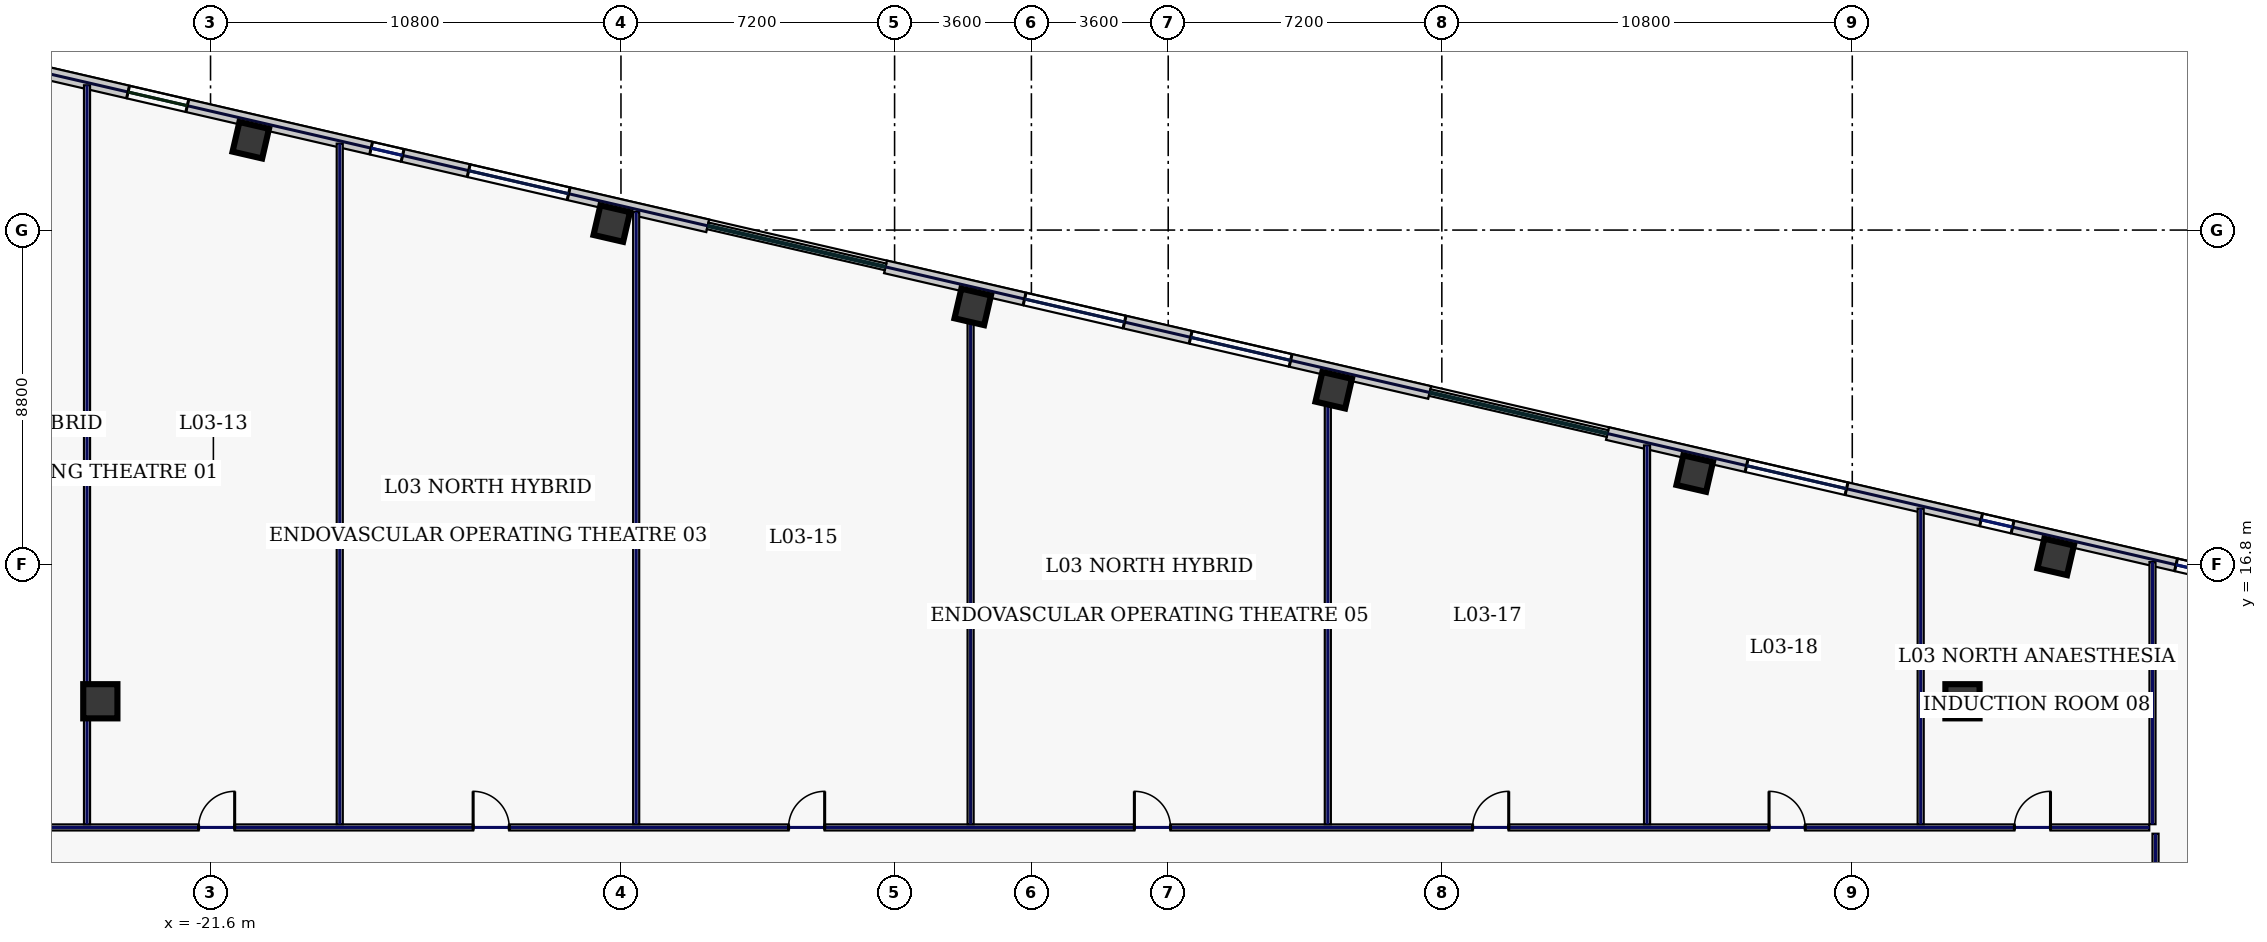
"""IFC4 building model, lengths in metres.
Left out: names, types, materials, properties, quantities, classifications, styles, units other than length and angle.
Written with IfcOpenShell. Run it as: python <this file> out.ifc"""

import sys

from ifc_helpers import new_model, si_unit, direction, frame, frame_2d, origin, origin_2d, place, context, subcontext, project, spatial, rectangle, hollow_rectangle, extrude, element, fill, save


model = new_model("IFC4")
c1 = context("Model", 3, precision=1e-05, world=origin(), true_north=direction((0.0, 1.0)))
c2 = subcontext(c1, "Body", "Model", "MODEL_VIEW")
j1 = project(units=[si_unit("LENGTHUNIT", "METRE"), si_unit("PLANEANGLEUNIT", "RADIAN")], contexts=[c1])
p1 = place(None, origin())
s1 = spatial("IfcSite", under=j1, at=p1, CompositionType="ELEMENT")
p2 = place(p1, origin())
s2 = spatial("IfcBuilding", under=s1, at=p2, CompositionType="ELEMENT")
p3 = place(p2, frame((0.0, 0.0, 18.4)))
s3 = spatial("IfcBuildingStorey", under=s2, at=p3, CompositionType="ELEMENT", Elevation=18.4)
for number, where, z_axis, x_axis in (
    (1, (-24.5, 13.2, 0.0), (0.0, 0.0, 1.0), (1.0, 0.0, 0.0)),
    (2, (24.5, 13.2, 0.0), (0.0, 0.0, 1.0), (1.0, 0.0, 0.0)),
):
    element("IfcColumn", number, at=place(p3, frame(where, z_axis=z_axis, x_axis=x_axis)), inside=s3, PredefinedType="COLUMN", context=c2, shape_type="SweptSolid", body=[
        extrude(hollow_rectangle(XDim=0.9, YDim=0.9, WallThickness=0.04, at=origin_2d()), origin(), (0.0, 0.0, 1.0), 4.7),
    ])
for number, where, z_axis, x_axis in (
    (3, (26.952, 16.999, 0.0), (0.0, 0.0, 1.0), (0.974, -0.225, 0.0)),
    (4, (17.454, 19.192, 0.0), (0.0, 0.0, 1.0), (0.974, -0.225, 0.0)),
    (5, (7.955, 21.385, 0.0), (0.0, 0.0, 1.0), (0.974, -0.225, 0.0)),
    (6, (-1.544, 23.578, 0.0), (0.0, 0.0, 1.0), (0.974, -0.225, 0.0)),
    (7, (-11.042, 25.771, 0.0), (0.0, 0.0, 1.0), (0.974, -0.225, 0.0)),
    (8, (-20.541, 27.964, 0.0), (0.0, 0.0, 1.0), (0.974, -0.225, 0.0)),
):
    element("IfcColumn", number, at=place(p3, frame(where, z_axis=z_axis, x_axis=x_axis)), inside=s3, PredefinedType="COLUMN", context=c2, shape_type="SweptSolid", body=[
        extrude(hollow_rectangle(XDim=0.8, YDim=0.8, WallThickness=0.036, at=origin_2d()), origin(), (0.0, 0.0, 1.0), 4.7),
    ])
p4 = place(p3, frame((37.229, 15.15, 0.0), z_axis=(0.0, 0.0, 1.0), x_axis=(-0.97436993772, 0.224951604723, 0.0)))
e9 = element("IfcWall", 9, at=p4, inside=s3, PredefinedType="STANDARD", context=c2, shape_type="SweptSolid", body=[
    extrude(rectangle(XDim=22.651, YDim=0.34, at=frame_2d((11.326, 0.0))), origin(), (0.0, 0.0, 1.0), 4.7),
])
p5 = place(p4, frame((16.195, 0.0, 0.9)))
e10 = element("IfcOpeningElement", 10, at=p5, cuts=e9, PredefinedType="OPENING", context=c2, shape_type="SweptSolid", body=[
    extrude(rectangle(XDim=2.7, YDim=2.2, at=frame_2d((1.35, 1.1))), frame((0.0, 0.18, 0.0), z_axis=(0.0, -1.0, 0.0), x_axis=(1.0, 0.0, 0.0)), (0.0, 0.0, 1.0), 0.36),
])
p6 = place(p4, frame((11.711, 0.0, 0.9)))
e11 = element("IfcOpeningElement", 11, at=p6, cuts=e9, PredefinedType="OPENING", context=c2, shape_type="SweptSolid", body=[
    extrude(rectangle(XDim=0.85, YDim=1.85, at=frame_2d((0.425, 0.925))), frame((0.0, 0.18, 0.0), z_axis=(0.0, -1.0, 0.0), x_axis=(1.0, 0.0, 0.0)), (0.0, 0.0, 1.0), 0.36),
])
p7 = place(p4, frame((6.447, 0.0, 0.9)))
e12 = element("IfcOpeningElement", 12, at=p7, cuts=e9, PredefinedType="OPENING", context=c2, shape_type="SweptSolid", body=[
    extrude(rectangle(XDim=0.85, YDim=1.85, at=frame_2d((0.425, 0.925))), frame((0.0, 0.18, 0.0), z_axis=(0.0, -1.0, 0.0), x_axis=(1.0, 0.0, 0.0)), (0.0, 0.0, 1.0), 0.36),
])
p8 = place(p4, frame((1.962, 0.0, 0.9)))
e13 = element("IfcOpeningElement", 13, at=p8, cuts=e9, PredefinedType="OPENING", context=c2, shape_type="SweptSolid", body=[
    extrude(rectangle(XDim=2.7, YDim=2.2, at=frame_2d((1.35, 1.1))), frame((0.0, 0.18, 0.0), z_axis=(0.0, -1.0, 0.0), x_axis=(1.0, 0.0, 0.0)), (0.0, 0.0, 1.0), 0.36),
])
p9 = place(p3, frame((10.481, 21.325, 0.0), z_axis=(0.0, 0.0, 1.0), x_axis=(-0.974369353393, 0.2249541357, 0.0)))
e14 = element("IfcWall", 14, at=p9, inside=s3, PredefinedType="STANDARD", context=c2, shape_type="SweptSolid", body=[
    extrude(rectangle(XDim=14.697, YDim=0.34, at=frame_2d((7.349, 0.0))), origin(), (0.0, 0.0, 1.0), 4.7),
])
p10 = place(p9, frame((8.241, 0.0, 0.9)))
e15 = element("IfcOpeningElement", 15, at=p10, cuts=e14, PredefinedType="OPENING", context=c2, shape_type="SweptSolid", body=[
    extrude(rectangle(XDim=2.7, YDim=2.2, at=frame_2d((1.35, 1.1))), frame((0.0, 0.18, 0.0), z_axis=(0.0, -1.0, 0.0), x_axis=(1.0, 0.0, 0.0)), (0.0, 0.0, 1.0), 0.36),
])
p11 = place(p9, frame((3.756, 0.0, 0.9)))
e16 = element("IfcOpeningElement", 16, at=p11, cuts=e14, PredefinedType="OPENING", context=c2, shape_type="SweptSolid", body=[
    extrude(rectangle(XDim=2.7, YDim=2.2, at=frame_2d((1.35, 1.1))), frame((0.0, 0.18, 0.0), z_axis=(0.0, -1.0, 0.0), x_axis=(1.0, 0.0, 0.0)), (0.0, 0.0, 1.0), 0.36),
])
p12 = place(p3, frame((-8.517, 25.711, 0.0), z_axis=(0.0, 0.0, 1.0), x_axis=(-0.974372845456, 0.224939009598, 0.0)))
e17 = element("IfcWall", 17, at=p12, inside=s3, PredefinedType="STANDARD", context=c2, shape_type="SweptSolid", body=[
    extrude(rectangle(XDim=22.652, YDim=0.34, at=frame_2d((11.326, 0.0))), origin(), (0.0, 0.0, 1.0), 4.7),
])
p13 = place(p12, frame((17.989, 0.0, 0.9)))
e18 = element("IfcOpeningElement", 18, at=p13, cuts=e17, PredefinedType="OPENING", context=c2, shape_type="SweptSolid", body=[
    extrude(rectangle(XDim=2.7, YDim=2.2, at=frame_2d((1.35, 1.1))), frame((0.0, 0.18, 0.0), z_axis=(0.0, -1.0, 0.0), x_axis=(1.0, 0.0, 0.0)), (0.0, 0.0, 1.0), 0.36),
])
p14 = place(p12, frame((14.055, 0.0, 0.22)))
e19 = element("IfcOpeningElement", 19, at=p14, cuts=e17, PredefinedType="OPENING", context=c2, shape_type="SweptSolid", body=[
    extrude(rectangle(XDim=1.6, YDim=1.2, at=frame_2d((0.8, 0.6))), frame((0.0, 0.18, 0.0), z_axis=(0.0, -1.0, 0.0), x_axis=(1.0, 0.0, 0.0)), (0.0, 0.0, 1.0), 0.36),
])
p15 = place(p12, frame((8.241, 0.0, 0.9)))
e20 = element("IfcOpeningElement", 20, at=p15, cuts=e17, PredefinedType="OPENING", context=c2, shape_type="SweptSolid", body=[
    extrude(rectangle(XDim=0.85, YDim=1.85, at=frame_2d((0.425, 0.925))), frame((0.0, 0.18, 0.0), z_axis=(0.0, -1.0, 0.0), x_axis=(1.0, 0.0, 0.0)), (0.0, 0.0, 1.0), 0.36),
])
p16 = place(p12, frame((3.756, 0.0, 0.9)))
e21 = element("IfcOpeningElement", 21, at=p16, cuts=e17, PredefinedType="OPENING", context=c2, shape_type="SweptSolid", body=[
    extrude(rectangle(XDim=2.7, YDim=2.2, at=frame_2d((1.35, 1.1))), frame((0.0, 0.18, 0.0), z_axis=(0.0, -1.0, 0.0), x_axis=(1.0, 0.0, 0.0)), (0.0, 0.0, 1.0), 0.36),
])
p17 = place(p3, frame((-29.415, 9.88, 0.0), z_axis=(0.0, 0.0, 1.0), x_axis=(1.0, 0.0, 0.0)))
e22 = element("IfcWall", 22, at=p17, inside=s3, PredefinedType="PARTITIONING", context=c2, shape_type="SweptSolid", body=[
    extrude(rectangle(XDim=58.83, YDim=0.16, at=frame_2d((29.415, 0.0))), origin(), (0.0, 0.0, 1.0), 4.7),
])
p18 = place(p17, frame((2.044, 0.0, 0.0)))
e23 = element("IfcOpeningElement", 23, at=p18, cuts=e22, PredefinedType="OPENING", context=c2, shape_type="SweptSolid", body=[
    extrude(rectangle(XDim=0.95, YDim=2.2, at=frame_2d((0.475, 1.1))), frame((0.0, 0.09, 0.0), z_axis=(0.0, -1.0, 0.0), x_axis=(1.0, 0.0, 0.0)), (0.0, 0.0, 1.0), 0.18),
])
p19 = place(p17, frame((7.5, 0.0, 0.0)))
e24 = element("IfcOpeningElement", 24, at=p19, cuts=e22, PredefinedType="OPENING", context=c2, shape_type="SweptSolid", body=[
    extrude(rectangle(XDim=0.95, YDim=2.2, at=frame_2d((0.475, 1.1))), frame((0.0, 0.09, 0.0), z_axis=(0.0, -1.0, 0.0), x_axis=(1.0, 0.0, 0.0)), (0.0, 0.0, 1.0), 0.18),
])
p20 = place(p17, frame((14.725, 0.0, 0.0)))
e25 = element("IfcOpeningElement", 25, at=p20, cuts=e22, PredefinedType="OPENING", context=c2, shape_type="SweptSolid", body=[
    extrude(rectangle(XDim=0.95, YDim=2.2, at=frame_2d((0.475, 1.1))), frame((0.0, 0.09, 0.0), z_axis=(0.0, -1.0, 0.0), x_axis=(1.0, 0.0, 0.0)), (0.0, 0.0, 1.0), 0.18),
])
p21 = place(p17, frame((23.025, 0.0, 0.0)))
e26 = element("IfcOpeningElement", 26, at=p21, cuts=e22, PredefinedType="OPENING", context=c2, shape_type="SweptSolid", body=[
    extrude(rectangle(XDim=0.95, YDim=2.2, at=frame_2d((0.475, 1.1))), frame((0.0, 0.09, 0.0), z_axis=(0.0, -1.0, 0.0), x_axis=(1.0, 0.0, 0.0)), (0.0, 0.0, 1.0), 0.18),
])
p22 = place(p17, frame((32.125, 0.0, 0.0)))
e27 = element("IfcOpeningElement", 27, at=p22, cuts=e22, PredefinedType="OPENING", context=c2, shape_type="SweptSolid", body=[
    extrude(rectangle(XDim=0.95, YDim=2.2, at=frame_2d((0.475, 1.1))), frame((0.0, 0.09, 0.0), z_axis=(0.0, -1.0, 0.0), x_axis=(1.0, 0.0, 0.0)), (0.0, 0.0, 1.0), 0.18),
])
p23 = place(p17, frame((41.025, 0.0, 0.0)))
e28 = element("IfcOpeningElement", 28, at=p23, cuts=e22, PredefinedType="OPENING", context=c2, shape_type="SweptSolid", body=[
    extrude(rectangle(XDim=0.95, YDim=2.2, at=frame_2d((0.475, 1.1))), frame((0.0, 0.09, 0.0), z_axis=(0.0, -1.0, 0.0), x_axis=(1.0, 0.0, 0.0)), (0.0, 0.0, 1.0), 0.18),
])
p24 = place(p17, frame((48.825, 0.0, 0.0)))
e29 = element("IfcOpeningElement", 29, at=p24, cuts=e22, PredefinedType="OPENING", context=c2, shape_type="SweptSolid", body=[
    extrude(rectangle(XDim=0.95, YDim=2.2, at=frame_2d((0.475, 1.1))), frame((0.0, 0.09, 0.0), z_axis=(0.0, -1.0, 0.0), x_axis=(1.0, 0.0, 0.0)), (0.0, 0.0, 1.0), 0.18),
])
p25 = place(p17, frame((55.281, 0.0, 0.0)))
e30 = element("IfcOpeningElement", 30, at=p25, cuts=e22, PredefinedType="OPENING", context=c2, shape_type="SweptSolid", body=[
    extrude(rectangle(XDim=0.95, YDim=2.2, at=frame_2d((0.475, 1.1))), frame((0.0, 0.09, 0.0), z_axis=(0.0, -1.0, 0.0), x_axis=(1.0, 0.0, 0.0)), (0.0, 0.0, 1.0), 0.18),
])
p26 = place(p3, frame((29.58, 9.715, 0.0), z_axis=(0.0, 0.0, 1.0), x_axis=(0.0, -1.0, 0.0)))
e31 = element("IfcWall", 31, at=p26, inside=s3, PredefinedType="PARTITIONING", context=c2, shape_type="SweptSolid", body=[
    extrude(rectangle(XDim=19.43, YDim=0.16, at=frame_2d((9.715, 0.0))), origin(), (0.0, 0.0, 1.0), 4.7),
])
p27 = place(p26, frame((16.631, 0.0, 0.0)))
e32 = element("IfcOpeningElement", 32, at=p27, cuts=e31, PredefinedType="OPENING", context=c2, shape_type="SweptSolid", body=[
    extrude(rectangle(XDim=0.95, YDim=2.2, at=frame_2d((0.475, 1.1))), frame((0.0, 0.09, 0.0), z_axis=(0.0, -1.0, 0.0), x_axis=(1.0, 0.0, 0.0)), (0.0, 0.0, 1.0), 0.18),
])
p28 = place(p26, frame((11.925, 0.0, 0.0)))
e33 = element("IfcOpeningElement", 33, at=p28, cuts=e31, PredefinedType="OPENING", context=c2, shape_type="SweptSolid", body=[
    extrude(rectangle(XDim=0.95, YDim=2.2, at=frame_2d((0.475, 1.1))), frame((0.0, 0.09, 0.0), z_axis=(0.0, -1.0, 0.0), x_axis=(1.0, 0.0, 0.0)), (0.0, 0.0, 1.0), 0.18),
])
p29 = place(p26, frame((6.725, 0.0, 0.0)))
e34 = element("IfcOpeningElement", 34, at=p29, cuts=e31, PredefinedType="OPENING", context=c2, shape_type="SweptSolid", body=[
    extrude(rectangle(XDim=0.95, YDim=2.2, at=frame_2d((0.475, 1.1))), frame((0.0, 0.09, 0.0), z_axis=(0.0, -1.0, 0.0), x_axis=(1.0, 0.0, 0.0)), (0.0, 0.0, 1.0), 0.18),
])
p30 = place(p26, frame((2.019, 0.0, 0.0)))
e35 = element("IfcOpeningElement", 35, at=p30, cuts=e31, PredefinedType="OPENING", context=c2, shape_type="SweptSolid", body=[
    extrude(rectangle(XDim=0.95, YDim=2.2, at=frame_2d((0.475, 1.1))), frame((0.0, 0.09, 0.0), z_axis=(0.0, -1.0, 0.0), x_axis=(1.0, 0.0, 0.0)), (0.0, 0.0, 1.0), 0.18),
])
p31 = place(p3, frame((29.5, 9.965, 0.0), z_axis=(0.0, 0.0, 1.0), x_axis=(0.0, 1.0, 0.0)))
e36 = element("IfcWall", 36, at=p31, inside=s3, PredefinedType="PARTITIONING", context=c2, shape_type="SweptSolid", body=[
    extrude(rectangle(XDim=6.897, YDim=0.16, at=frame_2d((3.449, 0.0))), origin(), (0.0, 0.0, 1.0), 4.7),
])
p32 = place(p3, frame((-24.85, 9.965, 0.0), z_axis=(0.0, 0.0, 1.0), x_axis=(0.0, 1.0, 0.0)))
e37 = element("IfcWall", 37, at=p32, inside=s3, PredefinedType="PARTITIONING", context=c2, shape_type="SweptSolid", body=[
    extrude(rectangle(XDim=19.445, YDim=0.16, at=frame_2d((9.723, 0.0))), origin(), (0.0, 0.0, 1.0), 4.7),
])
p33 = place(p3, frame((-18.2, 9.965, 0.0), z_axis=(0.0, 0.0, 1.0), x_axis=(0.0, 1.0, 0.0)))
e38 = element("IfcWall", 38, at=p33, inside=s3, PredefinedType="PARTITIONING", context=c2, shape_type="SweptSolid", body=[
    extrude(rectangle(XDim=17.91, YDim=0.16, at=frame_2d((8.955, 0.0))), origin(), (0.0, 0.0, 1.0), 4.7),
])
p34 = place(p3, frame((-10.4, 9.965, 0.0), z_axis=(0.0, 0.0, 1.0), x_axis=(0.0, 1.0, 0.0)))
e39 = element("IfcWall", 39, at=p34, inside=s3, PredefinedType="PARTITIONING", context=c2, shape_type="SweptSolid", body=[
    extrude(rectangle(XDim=16.109, YDim=0.16, at=frame_2d((8.054, 0.0))), origin(), (0.0, 0.0, 1.0), 4.7),
])
p35 = place(p3, frame((-1.6, 9.965, 0.0), z_axis=(0.0, 0.0, 1.0), x_axis=(0.0, 1.0, 0.0)))
e40 = element("IfcWall", 40, at=p35, inside=s3, PredefinedType="PARTITIONING", context=c2, shape_type="SweptSolid", body=[
    extrude(rectangle(XDim=14.077, YDim=0.16, at=frame_2d((7.039, 0.0))), origin(), (0.0, 0.0, 1.0), 4.195),
])
p36 = place(p3, frame((7.8, 9.965, 0.0), z_axis=(0.0, 0.0, 1.0), x_axis=(0.0, 1.0, 0.0)))
e41 = element("IfcWall", 41, at=p36, inside=s3, PredefinedType="PARTITIONING", context=c2, shape_type="SweptSolid", body=[
    extrude(rectangle(XDim=11.907, YDim=0.16, at=frame_2d((5.954, 0.0))), origin(), (0.0, 0.0, 1.0), 4.7),
])
p37 = place(p3, frame((16.2, 9.965, 0.0), z_axis=(0.0, 0.0, 1.0), x_axis=(0.0, 1.0, 0.0)))
e42 = element("IfcWall", 42, at=p37, inside=s3, PredefinedType="PARTITIONING", context=c2, shape_type="SweptSolid", body=[
    extrude(rectangle(XDim=9.968, YDim=0.16, at=frame_2d((4.984, 0.0))), origin(), (0.0, 0.0, 1.0), 4.7),
])
p38 = place(p3, frame((23.4, 9.965, 0.0), z_axis=(0.0, 0.0, 1.0), x_axis=(0.0, 1.0, 0.0)))
e43 = element("IfcWall", 43, at=p38, inside=s3, PredefinedType="PARTITIONING", context=c2, shape_type="SweptSolid", body=[
    extrude(rectangle(XDim=8.306, YDim=0.16, at=frame_2d((4.153, 0.0))), origin(), (0.0, 0.0, 1.0), 4.7),
])
p39 = place(p5, origin())
e44 = element("IfcWindow", 44, at=p39, inside=s3, PartitioningType="SINGLE_PANEL", PredefinedType="WINDOW", context=c2, shape_type="SweptSolid", body=[
    extrude(rectangle(XDim=2.7, YDim=2.2, at=frame_2d((1.35, 1.1))), frame((0.0, 0.03, 0.0), z_axis=(0.0, -1.0, 0.0), x_axis=(1.0, 0.0, 0.0)), (0.0, 0.0, 1.0), 0.06),
])
fill(e10, e44)
p40 = place(p6, origin())
e45 = element("IfcWindow", 45, at=p40, inside=s3, PartitioningType="SINGLE_PANEL", PredefinedType="WINDOW", context=c2, shape_type="SweptSolid", body=[
    extrude(rectangle(XDim=0.85, YDim=1.85, at=frame_2d((0.425, 0.925))), frame((0.0, 0.03, 0.0), z_axis=(0.0, -1.0, 0.0), x_axis=(1.0, 0.0, 0.0)), (0.0, 0.0, 1.0), 0.06),
])
fill(e11, e45)
p41 = place(p7, origin())
e46 = element("IfcWindow", 46, at=p41, inside=s3, PartitioningType="SINGLE_PANEL", PredefinedType="WINDOW", context=c2, shape_type="SweptSolid", body=[
    extrude(rectangle(XDim=0.85, YDim=1.85, at=frame_2d((0.425, 0.925))), frame((0.0, 0.03, 0.0), z_axis=(0.0, -1.0, 0.0), x_axis=(1.0, 0.0, 0.0)), (0.0, 0.0, 1.0), 0.06),
])
fill(e12, e46)
p42 = place(p10, origin())
e47 = element("IfcWindow", 47, at=p42, inside=s3, PartitioningType="SINGLE_PANEL", PredefinedType="WINDOW", context=c2, shape_type="SweptSolid", body=[
    extrude(rectangle(XDim=2.7, YDim=2.2, at=frame_2d((1.35, 1.1))), frame((0.0, 0.03, 0.0), z_axis=(0.0, -1.0, 0.0), x_axis=(1.0, 0.0, 0.0)), (0.0, 0.0, 1.0), 0.06),
])
fill(e15, e47)
p43 = place(p11, origin())
e48 = element("IfcWindow", 48, at=p43, inside=s3, PartitioningType="SINGLE_PANEL", PredefinedType="WINDOW", context=c2, shape_type="SweptSolid", body=[
    extrude(rectangle(XDim=2.7, YDim=2.2, at=frame_2d((1.35, 1.1))), frame((0.0, 0.03, 0.0), z_axis=(0.0, -1.0, 0.0), x_axis=(1.0, 0.0, 0.0)), (0.0, 0.0, 1.0), 0.06),
])
fill(e16, e48)
p44 = place(p14, origin())
e49 = element("IfcWindow", 49, at=p44, inside=s3, PartitioningType="SINGLE_PANEL", PredefinedType="WINDOW", context=c2, shape_type="SweptSolid", body=[
    extrude(rectangle(XDim=1.6, YDim=1.2, at=frame_2d((0.8, 0.6))), frame((0.0, 0.03, 0.0), z_axis=(0.0, -1.0, 0.0), x_axis=(1.0, 0.0, 0.0)), (0.0, 0.0, 1.0), 0.06),
])
fill(e19, e49)
p45 = place(p15, origin())
e50 = element("IfcWindow", 50, at=p45, inside=s3, PartitioningType="SINGLE_PANEL", PredefinedType="WINDOW", context=c2, shape_type="SweptSolid", body=[
    extrude(rectangle(XDim=0.85, YDim=1.85, at=frame_2d((0.425, 0.925))), frame((0.0, 0.03, 0.0), z_axis=(0.0, -1.0, 0.0), x_axis=(1.0, 0.0, 0.0)), (0.0, 0.0, 1.0), 0.06),
])
fill(e20, e50)
p46 = place(p16, origin())
e51 = element("IfcWindow", 51, at=p46, inside=s3, PartitioningType="SINGLE_PANEL", PredefinedType="WINDOW", context=c2, shape_type="SweptSolid", body=[
    extrude(rectangle(XDim=2.7, YDim=2.2, at=frame_2d((1.35, 1.1))), frame((0.0, 0.03, 0.0), z_axis=(0.0, -1.0, 0.0), x_axis=(1.0, 0.0, 0.0)), (0.0, 0.0, 1.0), 0.06),
])
fill(e21, e51)
p47 = place(p19, origin())
e52 = element("IfcDoor", 52, at=p47, inside=s3, OperationType="SINGLE_SWING_RIGHT", PredefinedType="DOOR", context=c2, shape_type="SweptSolid", body=[
    extrude(rectangle(XDim=0.95, YDim=2.2, at=frame_2d((0.475, 1.1))), frame((0.0, 0.025, 0.0), z_axis=(0.0, -1.0, 0.0), x_axis=(1.0, 0.0, 0.0)), (0.0, 0.0, 1.0), 0.05),
])
fill(e24, e52)
p48 = place(p20, origin())
e53 = element("IfcDoor", 53, at=p48, inside=s3, OperationType="SINGLE_SWING_LEFT", PredefinedType="DOOR", context=c2, shape_type="SweptSolid", body=[
    extrude(rectangle(XDim=0.95, YDim=2.2, at=frame_2d((0.475, 1.1))), frame((0.0, 0.025, 0.0), z_axis=(0.0, -1.0, 0.0), x_axis=(1.0, 0.0, 0.0)), (0.0, 0.0, 1.0), 0.05),
])
fill(e25, e53)
p49 = place(p21, origin())
e54 = element("IfcDoor", 54, at=p49, inside=s3, OperationType="SINGLE_SWING_RIGHT", PredefinedType="DOOR", context=c2, shape_type="SweptSolid", body=[
    extrude(rectangle(XDim=0.95, YDim=2.2, at=frame_2d((0.475, 1.1))), frame((0.0, 0.025, 0.0), z_axis=(0.0, -1.0, 0.0), x_axis=(1.0, 0.0, 0.0)), (0.0, 0.0, 1.0), 0.05),
])
fill(e26, e54)
p50 = place(p22, origin())
e55 = element("IfcDoor", 55, at=p50, inside=s3, OperationType="SINGLE_SWING_LEFT", PredefinedType="DOOR", context=c2, shape_type="SweptSolid", body=[
    extrude(rectangle(XDim=0.95, YDim=2.2, at=frame_2d((0.475, 1.1))), frame((0.0, 0.025, 0.0), z_axis=(0.0, -1.0, 0.0), x_axis=(1.0, 0.0, 0.0)), (0.0, 0.0, 1.0), 0.05),
])
fill(e27, e55)
p51 = place(p23, origin())
e56 = element("IfcDoor", 56, at=p51, inside=s3, OperationType="SINGLE_SWING_RIGHT", PredefinedType="DOOR", context=c2, shape_type="SweptSolid", body=[
    extrude(rectangle(XDim=0.95, YDim=2.2, at=frame_2d((0.475, 1.1))), frame((0.0, 0.025, 0.0), z_axis=(0.0, -1.0, 0.0), x_axis=(1.0, 0.0, 0.0)), (0.0, 0.0, 1.0), 0.05),
])
fill(e28, e56)
p52 = place(p24, origin())
e57 = element("IfcDoor", 57, at=p52, inside=s3, OperationType="SINGLE_SWING_LEFT", PredefinedType="DOOR", context=c2, shape_type="SweptSolid", body=[
    extrude(rectangle(XDim=0.95, YDim=2.2, at=frame_2d((0.475, 1.1))), frame((0.0, 0.025, 0.0), z_axis=(0.0, -1.0, 0.0), x_axis=(1.0, 0.0, 0.0)), (0.0, 0.0, 1.0), 0.05),
])
fill(e29, e57)
p53 = place(p25, origin())
e58 = element("IfcDoor", 58, at=p53, inside=s3, OperationType="SINGLE_SWING_RIGHT", PredefinedType="DOOR", context=c2, shape_type="SweptSolid", body=[
    extrude(rectangle(XDim=0.95, YDim=2.2, at=frame_2d((0.475, 1.1))), frame((0.0, 0.025, 0.0), z_axis=(0.0, -1.0, 0.0), x_axis=(1.0, 0.0, 0.0)), (0.0, 0.0, 1.0), 0.05),
])
fill(e30, e58)
save(model, sys.argv[1])
